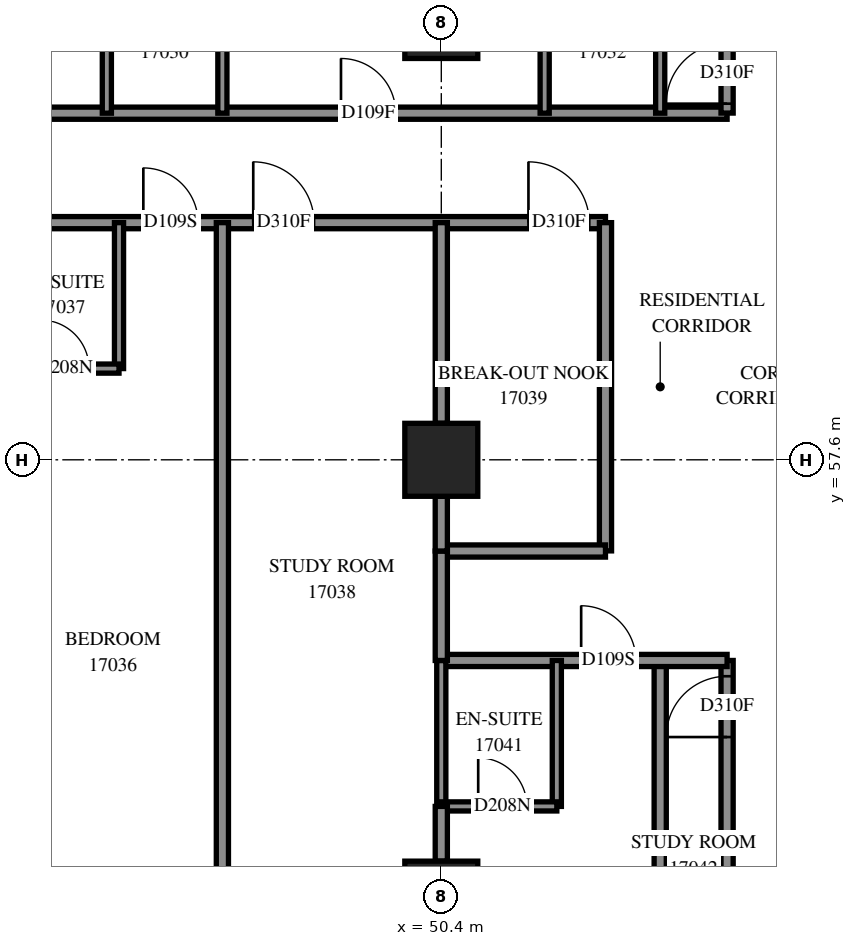
"""IFC4 building model, lengths in metres.
Left out: names, types, materials, properties, quantities, classifications, styles, units other than length and angle.
Written with IfcOpenShell. Run it as: python <this file> out.ifc"""

import sys

from ifc_helpers import new_model, si_unit, direction, frame, frame_2d, origin, origin_2d, place, context, subcontext, project, spatial, rectangle, extrude, element, fill, save


model = new_model("IFC4")
c1 = context("Model", 3, precision=1e-05, world=origin(), true_north=direction((0.0, 1.0)))
c2 = subcontext(c1, "Body", "Model", "MODEL_VIEW")
j1 = project(units=[si_unit("LENGTHUNIT", "METRE"), si_unit("PLANEANGLEUNIT", "RADIAN")], contexts=[c1])
p1 = place(None, origin())
s1 = spatial("IfcSite", under=j1, at=p1, CompositionType="ELEMENT")
p2 = place(p1, origin())
s2 = spatial("IfcBuilding", under=s1, at=p2, CompositionType="ELEMENT")
p3 = place(p2, frame((0.0, 0.0, 64.4)))
s3 = spatial("IfcBuildingStorey", under=s2, at=p3, CompositionType="ELEMENT", Elevation=64.4)
for number, where, z_axis, x_axis in (
    (1, (50.4, 50.4, 0.0), (0.0, 0.0, 1.0), (1.0, 0.0, 0.0)),
    (2, (50.4, 57.6, 0.0), (0.0, 0.0, 1.0), (1.0, 0.0, 0.0)),
    (3, (50.4, 64.8, 0.0), (0.0, 0.0, 1.0), (1.0, 0.0, 0.0)),
):
    element("IfcColumn", number, at=place(p3, frame(where, z_axis=z_axis, x_axis=x_axis)), inside=s3, PredefinedType="COLUMN", context=c2, shape_type="SweptSolid", body=[
        extrude(rectangle(XDim=1.2, YDim=1.2, at=origin_2d()), origin(), (0.0, 0.0, 1.0), 3.1),
    ])
p4 = place(p3, frame((28.8, 61.5, 0.0), z_axis=(0.0, 0.0, 1.0), x_axis=(1.0, 0.0, 0.0)))
e4 = element("IfcWall", 4, at=p4, inside=s3, PredefinedType="PARTITIONING", context=c2, shape_type="SweptSolid", body=[
    extrude(rectangle(XDim=24.3, YDim=0.2, at=frame_2d((12.15, 0.0))), origin(), (0.0, 0.0, 1.0), 3.1),
])
p5 = place(p4, frame((3.899, 0.0, 0.0)))
e5 = element("IfcOpeningElement", 5, at=p5, cuts=e4, PredefinedType="OPENING", context=c2, shape_type="SweptSolid", body=[
    extrude(rectangle(XDim=0.9, YDim=2.1, at=frame_2d((0.45, 1.05))), frame((0.0, 0.11, 0.0), z_axis=(0.0, -1.0, 0.0), x_axis=(1.0, 0.0, 0.0)), (0.0, 0.0, 1.0), 0.22),
])
p6 = place(p4, frame((9.5, 0.0, 0.0)))
e6 = element("IfcOpeningElement", 6, at=p6, cuts=e4, PredefinedType="OPENING", context=c2, shape_type="SweptSolid", body=[
    extrude(rectangle(XDim=0.9, YDim=2.1, at=frame_2d((0.45, 1.05))), frame((0.0, 0.11, 0.0), z_axis=(0.0, -1.0, 0.0), x_axis=(1.0, 0.0, 0.0)), (0.0, 0.0, 1.0), 0.22),
])
p7 = place(p4, frame((11.307, 0.0, 0.0)))
e7 = element("IfcOpeningElement", 7, at=p7, cuts=e4, PredefinedType="OPENING", context=c2, shape_type="SweptSolid", body=[
    extrude(rectangle(XDim=1.0, YDim=2.1, at=frame_2d((0.5, 1.05))), frame((0.0, 0.11, 0.0), z_axis=(0.0, -1.0, 0.0), x_axis=(1.0, 0.0, 0.0)), (0.0, 0.0, 1.0), 0.22),
])
p8 = place(p4, frame((16.7, 0.0, 0.0)))
e8 = element("IfcOpeningElement", 8, at=p8, cuts=e4, PredefinedType="OPENING", context=c2, shape_type="SweptSolid", body=[
    extrude(rectangle(XDim=0.9, YDim=2.1, at=frame_2d((0.45, 1.05))), frame((0.0, 0.11, 0.0), z_axis=(0.0, -1.0, 0.0), x_axis=(1.0, 0.0, 0.0)), (0.0, 0.0, 1.0), 0.22),
])
p9 = place(p4, frame((18.508, 0.0, 0.0)))
e9 = element("IfcOpeningElement", 9, at=p9, cuts=e4, PredefinedType="OPENING", context=c2, shape_type="SweptSolid", body=[
    extrude(rectangle(XDim=1.0, YDim=2.1, at=frame_2d((0.5, 1.05))), frame((0.0, 0.11, 0.0), z_axis=(0.0, -1.0, 0.0), x_axis=(1.0, 0.0, 0.0)), (0.0, 0.0, 1.0), 0.22),
])
p10 = place(p4, frame((23.033, 0.0, 0.0)))
e10 = element("IfcOpeningElement", 10, at=p10, cuts=e4, PredefinedType="OPENING", context=c2, shape_type="SweptSolid", body=[
    extrude(rectangle(XDim=1.0, YDim=2.1, at=frame_2d((0.5, 1.05))), frame((0.0, 0.11, 0.0), z_axis=(0.0, -1.0, 0.0), x_axis=(1.0, 0.0, 0.0)), (0.0, 0.0, 1.0), 0.22),
])
p11 = place(p3, frame((33.302, 63.3, 0.0), z_axis=(0.0, 0.0, 1.0), x_axis=(1.0, 0.0, 0.0)))
e11 = element("IfcWall", 11, at=p11, inside=s3, PredefinedType="PARTITIONING", context=c2, shape_type="SweptSolid", body=[
    extrude(rectangle(XDim=21.798, YDim=0.2, at=frame_2d((10.899, 0.0))), origin(), (0.0, 0.0, 1.0), 3.1),
])
p12 = place(p11, frame((1.091, 0.0, 0.0)))
e12 = element("IfcOpeningElement", 12, at=p12, cuts=e11, PredefinedType="OPENING", context=c2, shape_type="SweptSolid", body=[
    extrude(rectangle(XDim=0.9, YDim=2.1, at=frame_2d((0.45, 1.05))), frame((0.0, 0.11, 0.0), z_axis=(0.0, -1.0, 0.0), x_axis=(1.0, 0.0, 0.0)), (0.0, 0.0, 1.0), 0.22),
])
p13 = place(p11, frame((8.248, 0.0, 0.0)))
e13 = element("IfcOpeningElement", 13, at=p13, cuts=e11, PredefinedType="OPENING", context=c2, shape_type="SweptSolid", body=[
    extrude(rectangle(XDim=0.9, YDim=2.1, at=frame_2d((0.45, 1.05))), frame((0.0, 0.11, 0.0), z_axis=(0.0, -1.0, 0.0), x_axis=(1.0, 0.0, 0.0)), (0.0, 0.0, 1.0), 0.22),
])
p14 = place(p11, frame((15.448, 0.0, 0.0)))
e14 = element("IfcOpeningElement", 14, at=p14, cuts=e11, PredefinedType="OPENING", context=c2, shape_type="SweptSolid", body=[
    extrude(rectangle(XDim=0.9, YDim=2.1, at=frame_2d((0.45, 1.05))), frame((0.0, 0.11, 0.0), z_axis=(0.0, -1.0, 0.0), x_axis=(1.0, 0.0, 0.0)), (0.0, 0.0, 1.0), 0.22),
])
p15 = place(p3, frame((54.0, 42.3, 0.0), z_axis=(0.0, 0.0, 1.0), x_axis=(0.0, 1.0, 0.0)))
e15 = element("IfcWall", 15, at=p15, inside=s3, PredefinedType="PARTITIONING", context=c2, shape_type="SweptSolid", body=[
    extrude(rectangle(XDim=12.0, YDim=0.2, at=frame_2d((6.0, 0.0))), origin(), (0.0, 0.0, 1.0), 3.1),
])
p16 = place(p3, frame((46.8, 49.75, 0.0), z_axis=(0.0, 0.0, 1.0), x_axis=(0.0, 1.0, 0.0)))
e16 = element("IfcWall", 16, at=p16, inside=s3, PredefinedType="PARTITIONING", context=c2, shape_type="SweptSolid", body=[
    extrude(rectangle(XDim=11.75, YDim=0.2, at=frame_2d((5.875, 0.0))), origin(), (0.0, 0.0, 1.0), 3.1),
])
p17 = place(p3, frame((55.1, 47.9, 0.0), z_axis=(0.0, 0.0, 1.0), x_axis=(0.0, 1.0, 0.0)))
e17 = element("IfcWall", 17, at=p17, inside=s3, PredefinedType="PARTITIONING", context=c2, shape_type="SweptSolid", body=[
    extrude(rectangle(XDim=6.4, YDim=0.2, at=frame_2d((3.2, 0.0))), origin(), (0.0, 0.0, 1.0), 3.1),
])
p18 = place(p17, frame((5.141, 0.0, 0.0)))
e18 = element("IfcOpeningElement", 18, at=p18, cuts=e17, PredefinedType="OPENING", context=c2, shape_type="SweptSolid", body=[
    extrude(rectangle(XDim=1.0, YDim=2.1, at=frame_2d((0.5, 1.05))), frame((0.0, 0.11, 0.0), z_axis=(0.0, -1.0, 0.0), x_axis=(1.0, 0.0, 0.0)), (0.0, 0.0, 1.0), 0.22),
])
p19 = place(p3, frame((53.1, 56.102, 0.0), z_axis=(0.0, 0.0, 1.0), x_axis=(0.0, 1.0, 0.0)))
e19 = element("IfcWall", 19, at=p19, inside=s3, PredefinedType="PARTITIONING", context=c2, shape_type="SweptSolid", body=[
    extrude(rectangle(XDim=5.398, YDim=0.2, at=frame_2d((2.699, 0.0))), origin(), (0.0, 0.0, 1.0), 3.1),
])
p20 = place(p3, frame((50.4, 54.3, 0.0), z_axis=(0.0, 0.0, 1.0), x_axis=(1.0, 0.0, 0.0)))
e20 = element("IfcWall", 20, at=p20, inside=s3, PredefinedType="PARTITIONING", context=c2, shape_type="SweptSolid", body=[
    extrude(rectangle(XDim=4.7, YDim=0.2, at=frame_2d((2.35, 0.0))), origin(), (0.0, 0.0, 1.0), 3.1),
])
p21 = place(p20, frame((2.3, 0.0, 0.0)))
e21 = element("IfcOpeningElement", 21, at=p21, cuts=e20, PredefinedType="OPENING", context=c2, shape_type="SweptSolid", body=[
    extrude(rectangle(XDim=0.9, YDim=2.1, at=frame_2d((0.45, 1.05))), frame((0.0, 0.11, 0.0), z_axis=(0.0, -1.0, 0.0), x_axis=(1.0, 0.0, 0.0)), (0.0, 0.0, 1.0), 0.22),
])
p22 = place(p3, frame((55.1, 63.302, 0.0), z_axis=(0.0, 0.0, 1.0), x_axis=(0.0, 1.0, 0.0)))
e22 = element("IfcWall", 22, at=p22, inside=s3, PredefinedType="PARTITIONING", context=c2, shape_type="SweptSolid", body=[
    extrude(rectangle(XDim=3.998, YDim=0.2, at=frame_2d((1.999, 0.0))), origin(), (0.0, 0.0, 1.0), 3.1),
])
p23 = place(p22, frame((0.154, 0.0, 0.0)))
e23 = element("IfcOpeningElement", 23, at=p23, cuts=e22, PredefinedType="OPENING", context=c2, shape_type="SweptSolid", body=[
    extrude(rectangle(XDim=1.0, YDim=2.1, at=frame_2d((0.5, 1.05))), frame((0.0, 0.11, 0.0), z_axis=(0.0, -1.0, 0.0), x_axis=(1.0, 0.0, 0.0)), (0.0, 0.0, 1.0), 0.22),
])
p24 = place(p3, frame((50.4, 58.2, 0.0), z_axis=(0.0, 0.0, 1.0), x_axis=(0.0, 1.0, 0.0)))
e24 = element("IfcWall", 24, at=p24, inside=s3, PredefinedType="PARTITIONING", context=c2, shape_type="SweptSolid", body=[
    extrude(rectangle(XDim=3.3, YDim=0.2, at=frame_2d((1.65, 0.0))), origin(), (0.0, 0.0, 1.0), 3.1),
])
p25 = place(p3, frame((50.4, 56.1, 0.0), z_axis=(0.0, 0.0, 1.0), x_axis=(1.0, 0.0, 0.0)))
e25 = element("IfcWall", 25, at=p25, inside=s3, PredefinedType="PARTITIONING", context=c2, shape_type="SweptSolid", body=[
    extrude(rectangle(XDim=2.7, YDim=0.2, at=frame_2d((1.35, 0.0))), origin(), (0.0, 0.0, 1.0), 3.1),
])
for number, where, z_axis, x_axis in (
    (26, (44.9, 63.3, 0.0), (0.0, 0.0, 1.0), (0.0, 1.0, 0.0)),
    (27, (46.8, 63.3, 0.0), (0.0, 0.0, 1.0), (0.0, 1.0, 0.0)),
    (28, (52.1, 63.3, 0.0), (0.0, 0.0, 1.0), (0.0, 1.0, 0.0)),
    (29, (54.0, 63.3, 0.0), (0.0, 0.0, 1.0), (0.0, 1.0, 0.0)),
    (30, (45.1, 59.1, 0.0), (0.0, 0.0, 1.0), (0.0, 1.0, 0.0)),
    (31, (52.3, 51.9, 0.0), (0.0, 0.0, 1.0), (0.0, 1.0, 0.0)),
    (32, (50.4, 51.9, 0.0), (0.0, 0.0, 1.0), (0.0, 1.0, 0.0)),
):
    element("IfcWall", number, at=place(p3, frame(where, z_axis=z_axis, x_axis=x_axis)), inside=s3, PredefinedType="PARTITIONING", context=c2, shape_type="SweptSolid", body=[
        extrude(rectangle(XDim=2.4, YDim=0.15, at=frame_2d((1.2, 0.0))), origin(), (0.0, 0.0, 1.0), 3.1),
    ])
p26 = place(p3, frame((43.2, 59.1, 0.0), z_axis=(0.0, 0.0, 1.0), x_axis=(1.0, 0.0, 0.0)))
e33 = element("IfcWall", 33, at=p26, inside=s3, PredefinedType="PARTITIONING", context=c2, shape_type="SweptSolid", body=[
    extrude(rectangle(XDim=1.9, YDim=0.15, at=frame_2d((0.95, 0.0))), origin(), (0.0, 0.0, 1.0), 3.1),
])
p27 = place(p26, frame((0.607, 0.0, 0.0)))
e34 = element("IfcOpeningElement", 34, at=p27, cuts=e33, PredefinedType="OPENING", context=c2, shape_type="SweptSolid", body=[
    extrude(rectangle(XDim=0.8, YDim=2.1, at=frame_2d((0.4, 1.05))), frame((0.0, 0.085, 0.0), z_axis=(0.0, -1.0, 0.0), x_axis=(1.0, 0.0, 0.0)), (0.0, 0.0, 1.0), 0.17),
])
p28 = place(p3, frame((50.4, 51.9, 0.0), z_axis=(0.0, 0.0, 1.0), x_axis=(1.0, 0.0, 0.0)))
e35 = element("IfcWall", 35, at=p28, inside=s3, PredefinedType="PARTITIONING", context=c2, shape_type="SweptSolid", body=[
    extrude(rectangle(XDim=1.9, YDim=0.15, at=frame_2d((0.95, 0.0))), origin(), (0.0, 0.0, 1.0), 3.1),
])
p29 = place(p28, frame((0.607, 0.0, 0.0)))
e36 = element("IfcOpeningElement", 36, at=p29, cuts=e35, PredefinedType="OPENING", context=c2, shape_type="SweptSolid", body=[
    extrude(rectangle(XDim=0.8, YDim=2.1, at=frame_2d((0.4, 1.05))), frame((0.0, 0.085, 0.0), z_axis=(0.0, -1.0, 0.0), x_axis=(1.0, 0.0, 0.0)), (0.0, 0.0, 1.0), 0.17),
])
p30 = place(p3, frame((50.4, 54.3, 0.0), z_axis=(0.0, 0.0, 1.0), x_axis=(0.0, 1.0, 0.0)))
e37 = element("IfcWall", 37, at=p30, inside=s3, PredefinedType="PARTITIONING", context=c2, shape_type="SweptSolid", body=[
    extrude(rectangle(XDim=1.8, YDim=0.2, at=frame_2d((0.9, 0.0))), origin(), (0.0, 0.0, 1.0), 3.1),
])
for number, where, z_axis, x_axis in (
    (38, (50.4, 51.0, 0.0), (0.0, 0.0, 1.0), (0.0, 1.0, 0.0)),
    (39, (50.4, 56.1, 0.0), (0.0, 0.0, 1.0), (0.0, 1.0, 0.0)),
):
    element("IfcWall", number, at=place(p3, frame(where, z_axis=z_axis, x_axis=x_axis)), inside=s3, PredefinedType="PARTITIONING", context=c2, shape_type="SweptSolid", body=[
        extrude(rectangle(XDim=0.9, YDim=0.2, at=frame_2d((0.45, 0.0))), origin(), (0.0, 0.0, 1.0), 3.1),
    ])
p31 = place(p14, origin())
e40 = element("IfcDoor", 40, at=p31, inside=s3, OperationType="SINGLE_SWING_LEFT", PredefinedType="DOOR", context=c2, shape_type="SweptSolid", body=[
    extrude(rectangle(XDim=0.9, YDim=2.1, at=frame_2d((0.45, 1.05))), frame((0.0, 0.025, 0.0), z_axis=(0.0, -1.0, 0.0), x_axis=(1.0, 0.0, 0.0)), (0.0, 0.0, 1.0), 0.05),
])
fill(e14, e40)
p32 = place(p23, origin())
e41 = element("IfcDoor", 41, at=p32, inside=s3, OperationType="SINGLE_SWING_LEFT", PredefinedType="DOOR", context=c2, shape_type="SweptSolid", body=[
    extrude(rectangle(XDim=1.0, YDim=2.1, at=frame_2d((0.5, 1.05))), frame((0.0, 0.025, 0.0), z_axis=(0.0, -1.0, 0.0), x_axis=(1.0, 0.0, 0.0)), (0.0, 0.0, 1.0), 0.05),
])
fill(e23, e41)
p33 = place(p8, origin())
e42 = element("IfcDoor", 42, at=p33, inside=s3, OperationType="SINGLE_SWING_LEFT", PredefinedType="DOOR", context=c2, shape_type="SweptSolid", body=[
    extrude(rectangle(XDim=0.9, YDim=2.1, at=frame_2d((0.45, 1.05))), frame((0.0, 0.025, 0.0), z_axis=(0.0, -1.0, 0.0), x_axis=(1.0, 0.0, 0.0)), (0.0, 0.0, 1.0), 0.05),
])
fill(e8, e42)
p34 = place(p27, origin())
e43 = element("IfcDoor", 43, at=p34, inside=s3, OperationType="SINGLE_SWING_RIGHT", PredefinedType="DOOR", context=c2, shape_type="SweptSolid", body=[
    extrude(rectangle(XDim=0.8, YDim=2.1, at=frame_2d((0.4, 1.05))), frame((0.0, 0.025, 0.0), z_axis=(0.0, -1.0, 0.0), x_axis=(1.0, 0.0, 0.0)), (0.0, 0.0, 1.0), 0.05),
])
fill(e34, e43)
p35 = place(p9, origin())
e44 = element("IfcDoor", 44, at=p35, inside=s3, OperationType="SINGLE_SWING_RIGHT", PredefinedType="DOOR", context=c2, shape_type="SweptSolid", body=[
    extrude(rectangle(XDim=1.0, YDim=2.1, at=frame_2d((0.5, 1.05))), frame((0.0, 0.025, 0.0), z_axis=(0.0, -1.0, 0.0), x_axis=(1.0, 0.0, 0.0)), (0.0, 0.0, 1.0), 0.05),
])
fill(e9, e44)
p36 = place(p10, origin())
e45 = element("IfcDoor", 45, at=p36, inside=s3, OperationType="SINGLE_SWING_LEFT", PredefinedType="DOOR", context=c2, shape_type="SweptSolid", body=[
    extrude(rectangle(XDim=1.0, YDim=2.1, at=frame_2d((0.5, 1.05))), frame((0.0, 0.025, 0.0), z_axis=(0.0, -1.0, 0.0), x_axis=(1.0, 0.0, 0.0)), (0.0, 0.0, 1.0), 0.05),
])
fill(e10, e45)
p37 = place(p21, origin())
e46 = element("IfcDoor", 46, at=p37, inside=s3, OperationType="SINGLE_SWING_LEFT", PredefinedType="DOOR", context=c2, shape_type="SweptSolid", body=[
    extrude(rectangle(XDim=0.9, YDim=2.1, at=frame_2d((0.45, 1.05))), frame((0.0, 0.025, 0.0), z_axis=(0.0, -1.0, 0.0), x_axis=(1.0, 0.0, 0.0)), (0.0, 0.0, 1.0), 0.05),
])
fill(e21, e46)
p38 = place(p29, origin())
e47 = element("IfcDoor", 47, at=p38, inside=s3, OperationType="SINGLE_SWING_RIGHT", PredefinedType="DOOR", context=c2, shape_type="SweptSolid", body=[
    extrude(rectangle(XDim=0.8, YDim=2.1, at=frame_2d((0.4, 1.05))), frame((0.0, 0.025, 0.0), z_axis=(0.0, -1.0, 0.0), x_axis=(1.0, 0.0, 0.0)), (0.0, 0.0, 1.0), 0.05),
])
fill(e36, e47)
p39 = place(p18, origin())
e48 = element("IfcDoor", 48, at=p39, inside=s3, OperationType="SINGLE_SWING_RIGHT", PredefinedType="DOOR", context=c2, shape_type="SweptSolid", body=[
    extrude(rectangle(XDim=1.0, YDim=2.1, at=frame_2d((0.5, 1.05))), frame((0.0, 0.025, 0.0), z_axis=(0.0, -1.0, 0.0), x_axis=(1.0, 0.0, 0.0)), (0.0, 0.0, 1.0), 0.05),
])
fill(e18, e48)
save(model, sys.argv[1])
